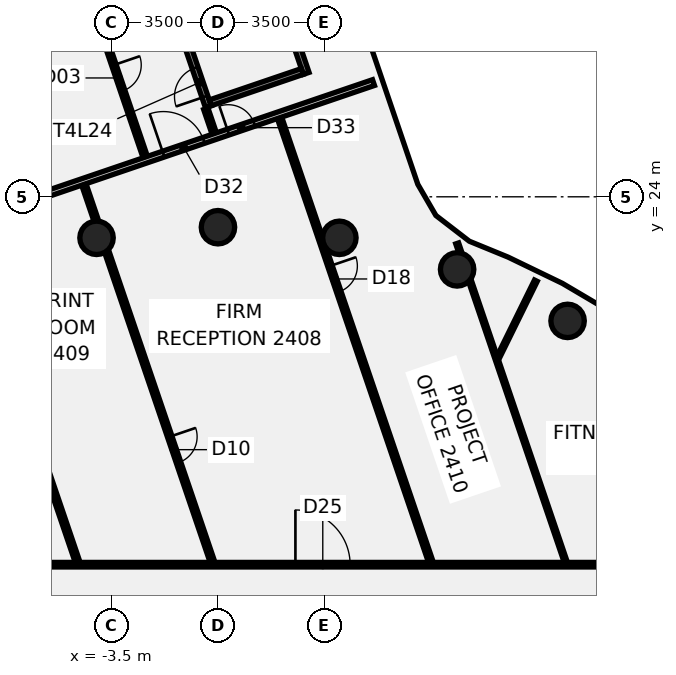
"""IFC4 building model, lengths in metres.
Left out: names, types, materials, properties, quantities, classifications, styles, units other than length and angle.
Written with IfcOpenShell. Run it as: python <this file> out.ifc"""

import sys

from ifc_helpers import new_model, si_unit, direction, frame, frame_2d, origin, origin_2d, place, context, subcontext, project, spatial, rectangle, circle, extrude, element, fill, save


model = new_model("IFC4")
c1 = context("Model", 3, precision=1e-05, world=origin(), true_north=direction((0.0, 1.0)))
c2 = subcontext(c1, "Body", "Model", "MODEL_VIEW")
j1 = project(units=[si_unit("LENGTHUNIT", "METRE"), si_unit("PLANEANGLEUNIT", "RADIAN")], contexts=[c1])
p1 = place(None, origin())
s1 = spatial("IfcSite", under=j1, at=p1, CompositionType="ELEMENT")
p2 = place(p1, origin())
s2 = spatial("IfcBuilding", under=s1, at=p2, CompositionType="ELEMENT")
p3 = place(p2, frame((0.0, 0.0, 102.25)))
s3 = spatial("IfcBuildingStorey", under=s2, at=p3, CompositionType="ELEMENT", Elevation=102.25)
for number, where, z_axis, x_axis in (
    (1, (11.5, 19.919, -0.14), (0.0, 0.0, 1.0), (1.0, 0.0, 0.0)),
    (2, (7.866, 21.613, -0.14), (0.0, 0.0, 1.0), (1.0, 0.0, 0.0)),
    (3, (3.994, 22.651, -0.14), (0.0, 0.0, 1.0), (1.0, 0.0, 0.0)),
    (4, (0.0, 23.0, -0.14), (0.0, 0.0, 1.0), (1.0, 0.0, 0.0)),
    (5, (-3.994, 22.651, -0.14), (0.0, 0.0, 1.0), (1.0, 0.0, 0.0)),
):
    element("IfcColumn", number, at=place(p3, frame(where, z_axis=z_axis, x_axis=x_axis)), inside=s3, PredefinedType="COLUMN", context=c2, shape_type="SweptSolid", body=[
        extrude(circle(Radius=0.55, at=origin_2d()), origin(), (0.0, 0.0, 1.0), 3.75),
    ])
p4 = place(p3, frame((-7.719, 21.092, 0.0), z_axis=(0.0, 0.0, 1.0), x_axis=(0.322369221252, -0.946614010666, 0.0)))
e6 = element("IfcWall", 6, at=p4, inside=s3, PredefinedType="PARTITIONING", context=c2, shape_type="SweptSolid", body=[
    extrude(rectangle(XDim=9.626, YDim=0.15, at=frame_2d((4.813, 0.0))), origin(), (0.0, 0.0, 1.0), 3.01),
])
p5 = place(p3, frame((-8.14, 42.178, 0.0), z_axis=(0.0, 0.0, 1.0), x_axis=(0.322499346539, -0.946569686543, 0.0)))
e7 = element("IfcWall", 7, at=p5, inside=s3, PredefinedType="PARTITIONING", context=c2, shape_type="SweptSolid", body=[
    extrude(rectangle(XDim=17.825, YDim=0.15, at=frame_2d((8.913, 0.0))), origin(), (0.0, 0.0, 1.0), 3.01),
])
p6 = place(p5, frame((14.625, 0.0, 0.0)))
e8 = element("IfcOpeningElement", 8, at=p6, cuts=e7, PredefinedType="OPENING", context=c2, shape_type="SweptSolid", body=[
    extrude(rectangle(XDim=0.9, YDim=2.1, at=frame_2d((0.45, 1.05))), frame((0.0, 0.085, 0.0), z_axis=(0.0, -1.0, 0.0), x_axis=(1.0, 0.0, 0.0)), (0.0, 0.0, 1.0), 0.17),
])
p7 = place(p5, frame((11.325, 0.0, 0.0)))
e9 = element("IfcOpeningElement", 9, at=p7, cuts=e7, PredefinedType="OPENING", context=c2, shape_type="SweptSolid", body=[
    extrude(rectangle(XDim=0.9, YDim=2.1, at=frame_2d((0.45, 1.05))), frame((0.0, 0.085, 0.0), z_axis=(0.0, -1.0, 0.0), x_axis=(1.0, 0.0, 0.0)), (0.0, 0.0, 1.0), 0.17),
])
p8 = place(p5, frame((5.625, 0.0, 0.0)))
e10 = element("IfcOpeningElement", 10, at=p8, cuts=e7, PredefinedType="OPENING", context=c2, shape_type="SweptSolid", body=[
    extrude(rectangle(XDim=0.9, YDim=2.1, at=frame_2d((0.45, 1.05))), frame((0.0, 0.085, 0.0), z_axis=(0.0, -1.0, 0.0), x_axis=(1.0, 0.0, 0.0)), (0.0, 0.0, 1.0), 0.17),
])
p9 = place(p5, frame((1.275, 0.0, 0.0)))
e11 = element("IfcOpeningElement", 11, at=p9, cuts=e7, PredefinedType="OPENING", context=c2, shape_type="SweptSolid", body=[
    extrude(rectangle(XDim=0.9, YDim=2.1, at=frame_2d((0.45, 1.05))), frame((0.0, 0.085, 0.0), z_axis=(0.0, -1.0, 0.0), x_axis=(1.0, 0.0, 0.0)), (0.0, 0.0, 1.0), 0.17),
])
p10 = place(p3, frame((-0.399, 26.893, 0.0), z_axis=(0.0, 0.0, 1.0), x_axis=(0.322691263615, -0.94650427806, 0.0)))
e12 = element("IfcWall", 12, at=p10, inside=s3, PredefinedType="PARTITIONING", context=c2, shape_type="SweptSolid", body=[
    extrude(rectangle(XDim=0.86, YDim=0.15, at=frame_2d((0.43, 0.0))), origin(), (0.0, 0.0, 1.0), 3.01),
])
p11 = place(p3, frame((-4.411, 24.406, 0.0), z_axis=(0.0, 0.0, 1.0), x_axis=(0.322528601909, -0.94655971864, 0.0)))
e13 = element("IfcWall", 13, at=p11, inside=s3, PredefinedType="PARTITIONING", context=c2, shape_type="SweptSolid", body=[
    extrude(rectangle(XDim=1.266, YDim=0.15, at=frame_2d((0.633, 0.0))), origin(), (0.0, 0.0, 1.0), 3.01),
])
p12 = place(p3, frame((-3.665, 22.215, 0.0), z_axis=(0.0, 0.0, 1.0), x_axis=(0.322345171012, -0.94662220063, 0.0)))
e14 = element("IfcWall", 14, at=p12, inside=s3, PredefinedType="PARTITIONING", context=c2, shape_type="SweptSolid", body=[
    extrude(rectangle(XDim=10.812, YDim=0.15, at=frame_2d((5.406, 0.0))), origin(), (0.0, 0.0, 1.0), 3.01),
])
p13 = place(p12, frame((6.45, 0.0, 0.0)))
e15 = element("IfcOpeningElement", 15, at=p13, cuts=e14, PredefinedType="OPENING", context=c2, shape_type="SweptSolid", body=[
    extrude(rectangle(XDim=0.9, YDim=2.1, at=frame_2d((0.45, 1.05))), frame((0.0, 0.085, 0.0), z_axis=(0.0, -1.0, 0.0), x_axis=(1.0, 0.0, 0.0)), (0.0, 0.0, 1.0), 0.17),
])
p14 = place(p3, frame((2.027, 26.594, 0.0), z_axis=(0.0, 0.0, 1.0), x_axis=(0.322388935649, -0.946607296703, 0.0)))
e16 = element("IfcWall", 16, at=p14, inside=s3, PredefinedType="PARTITIONING", context=c2, shape_type="SweptSolid", body=[
    extrude(rectangle(XDim=15.437, YDim=0.15, at=frame_2d((7.719, 0.0))), origin(), (0.0, 0.0, 1.0), 3.01),
])
p15 = place(p14, frame((5.145, 0.0, 0.0)))
e17 = element("IfcOpeningElement", 17, at=p15, cuts=e16, PredefinedType="OPENING", context=c2, shape_type="SweptSolid", body=[
    extrude(rectangle(XDim=0.9, YDim=2.1, at=frame_2d((0.45, 1.05))), frame((0.0, 0.085, 0.0), z_axis=(0.0, -1.0, 0.0), x_axis=(1.0, 0.0, 0.0)), (0.0, 0.0, 1.0), 0.17),
])
p16 = place(p3, frame((7.869, 22.467, 0.0), z_axis=(0.0, 0.0, 1.0), x_axis=(0.321992129505, -0.946742345381, 0.0)))
e18 = element("IfcWall", 18, at=p16, inside=s3, PredefinedType="PARTITIONING", context=c2, shape_type="SweptSolid", body=[
    extrude(rectangle(XDim=0.343, YDim=0.1, at=frame_2d((0.171, 0.0))), origin(), (0.0, 0.0, 1.0), 3.01),
])
p17 = place(p3, frame((8.28, 21.261, 0.0), z_axis=(0.0, 0.0, 1.0), x_axis=(0.322373413617, -0.946612582947, 0.0)))
e19 = element("IfcWall", 19, at=p17, inside=s3, PredefinedType="PARTITIONING", context=c2, shape_type="SweptSolid", body=[
    extrude(rectangle(XDim=9.81, YDim=0.1, at=frame_2d((4.905, 0.0))), origin(), (0.0, 0.0, 1.0), 3.01),
])
p18 = place(p3, frame((-17.065, 11.9, 0.0), z_axis=(0.0, 0.0, 1.0), x_axis=(1.0, 0.0, 0.0)))
e20 = element("IfcWall", 20, at=p18, inside=s3, PredefinedType="PARTITIONING", context=c2, shape_type="SweptSolid", body=[
    extrude(rectangle(XDim=34.165, YDim=0.15, at=frame_2d((17.083, 0.0))), origin(), (0.0, 0.0, 1.0), 3.01),
])
p19 = place(p18, frame((19.613, 0.0, 0.0)))
e21 = element("IfcOpeningElement", 21, at=p19, cuts=e20, PredefinedType="OPENING", context=c2, shape_type="SweptSolid", body=[
    extrude(rectangle(XDim=1.8, YDim=2.1, at=frame_2d((0.9, 1.05))), frame((0.0, 0.085, 0.0), z_axis=(0.0, -1.0, 0.0), x_axis=(1.0, 0.0, 0.0)), (0.0, 0.0, 1.0), 0.17),
])
p20 = place(p18, frame((30.933, 0.0, 0.0)))
e22 = element("IfcOpeningElement", 22, at=p20, cuts=e20, PredefinedType="OPENING", context=c2, shape_type="SweptSolid", body=[
    extrude(rectangle(XDim=1.8, YDim=2.1, at=frame_2d((0.9, 1.05))), frame((0.0, 0.085, 0.0), z_axis=(0.0, -1.0, 0.0), x_axis=(1.0, 0.0, 0.0)), (0.0, 0.0, 1.0), 0.17),
])
p21 = place(p18, frame((5.365, 0.0, 0.0)))
e23 = element("IfcOpeningElement", 23, at=p21, cuts=e20, PredefinedType="OPENING", context=c2, shape_type="SweptSolid", body=[
    extrude(rectangle(XDim=1.8, YDim=2.1, at=frame_2d((0.9, 1.05))), frame((0.0, 0.085, 0.0), z_axis=(0.0, -1.0, 0.0), x_axis=(1.0, 0.0, 0.0)), (0.0, 0.0, 1.0), 0.17),
])
p22 = place(p3, frame((-7.336, 28.27, 0.0), z_axis=(0.0, 0.0, 1.0), x_axis=(0.946629051869, 0.322325050467, 0.0)))
e24 = element("IfcWall", 24, at=p22, inside=s3, PredefinedType="PARTITIONING", context=c2, shape_type="SweptSolid", body=[
    extrude(rectangle(XDim=3.648, YDim=0.1, at=frame_2d((1.824, 0.0))), origin(), (0.0, 0.0, 1.0), 3.01),
])
p23 = place(p3, frame((-8.348, 23.171, 0.0), z_axis=(0.0, 0.0, 1.0), x_axis=(0.946615697292, 0.322364268555, 0.0)))
e25 = element("IfcWall", 25, at=p23, inside=s3, PredefinedType="PARTITIONING", context=c2, shape_type="SweptSolid", body=[
    extrude(rectangle(XDim=14.224, YDim=0.2, at=frame_2d((7.112, 0.0))), origin(), (0.0, 0.0, 1.0), 3.01),
])
p24 = place(p23, frame((6.925, 0.0, 0.0)))
e26 = element("IfcOpeningElement", 26, at=p24, cuts=e25, PredefinedType="OPENING", context=c2, shape_type="SweptSolid", body=[
    extrude(rectangle(XDim=1.4, YDim=2.1, at=frame_2d((0.7, 1.05))), frame((0.0, 0.11, 0.0), z_axis=(0.0, -1.0, 0.0), x_axis=(1.0, 0.0, 0.0)), (0.0, 0.0, 1.0), 0.22),
])
p25 = place(p23, frame((9.175, 0.0, 0.0)))
e27 = element("IfcOpeningElement", 27, at=p25, cuts=e25, PredefinedType="OPENING", context=c2, shape_type="SweptSolid", body=[
    extrude(rectangle(XDim=0.9, YDim=2.1, at=frame_2d((0.45, 1.05))), frame((0.0, 0.11, 0.0), z_axis=(0.0, -1.0, 0.0), x_axis=(1.0, 0.0, 0.0)), (0.0, 0.0, 1.0), 0.22),
])
p26 = place(p3, frame((9.219, 18.726, 0.0), z_axis=(0.0, 0.0, 1.0), x_axis=(0.441524350623, 0.897249267376, 0.0)))
e28 = element("IfcWall", 28, at=p26, inside=s3, PredefinedType="PARTITIONING", context=c2, shape_type="SweptSolid", body=[
    extrude(rectangle(XDim=2.802, YDim=0.1, at=frame_2d((1.401, 0.0))), origin(), (0.0, 0.0, 1.0), 3.01),
])
p27 = place(p3, frame((-0.317, 26.963, -0.14), z_axis=(0.0, 0.0, 1.0), x_axis=(-0.322375655092, 0.946611819599, 0.0)))
e29 = element("IfcWall", 29, at=p27, inside=s3, PredefinedType="SHEAR", context=c2, shape_type="SweptSolid", body=[
    extrude(rectangle(XDim=6.7, YDim=0.2, at=frame_2d((3.35, 0.0))), origin(), (0.0, 0.0, 1.0), 3.15),
])
p28 = place(p27, frame((0.35, 0.0, 0.0)))
e30 = element("IfcOpeningElement", 30, at=p28, cuts=e29, PredefinedType="OPENING", context=c2, shape_type="SweptSolid", body=[
    extrude(rectangle(XDim=1.0, YDim=2.1, at=frame_2d((0.5, 1.05))), frame((0.0, 0.11, 0.0), z_axis=(0.0, -1.0, 0.0), x_axis=(1.0, 0.0, 0.0)), (0.0, 0.0, 1.0), 0.22),
])
p29 = place(p3, frame((2.902, 28.059, -0.14), z_axis=(0.0, 0.0, 1.0), x_axis=(-0.322375655092, 0.946611819599, 0.0)))
e31 = element("IfcWall", 31, at=p29, inside=s3, PredefinedType="SHEAR", context=c2, shape_type="SweptSolid", body=[
    extrude(rectangle(XDim=6.7, YDim=0.2, at=frame_2d((3.35, 0.0))), origin(), (0.0, 0.0, 1.0), 3.15),
])
p30 = place(p3, frame((2.775, 28.121, -0.14), z_axis=(0.0, 0.0, 1.0), x_axis=(-0.946603348589, -0.322400527977, 0.0)))
e32 = element("IfcWall", 32, at=p30, inside=s3, PredefinedType="SHEAR", context=c2, shape_type="SweptSolid", body=[
    extrude(rectangle(XDim=3.2, YDim=0.2, at=frame_2d((1.6, 0.0))), origin(), (0.0, 0.0, 1.0), 3.15),
])
p31 = place(p6, frame((0.9, 0.0, 0.0), z_axis=(0.0, 0.0, 1.0), x_axis=(-1.0, 0.0, 0.0)))
e33 = element("IfcDoor", 33, at=p31, inside=s3, OperationType="SINGLE_SWING_RIGHT", PredefinedType="DOOR", context=c2, shape_type="SweptSolid", body=[
    extrude(rectangle(XDim=0.9, YDim=2.1, at=frame_2d((0.45, 1.05))), frame((0.0, 0.025, 0.0), z_axis=(0.0, -1.0, 0.0), x_axis=(1.0, 0.0, 0.0)), (0.0, 0.0, 1.0), 0.05),
])
fill(e8, e33)
p32 = place(p13, frame((0.9, 0.0, 0.0), z_axis=(0.0, 0.0, 1.0), x_axis=(-1.0, 0.0, 0.0)))
e34 = element("IfcDoor", 34, at=p32, inside=s3, OperationType="SINGLE_SWING_RIGHT", PredefinedType="DOOR", context=c2, shape_type="SweptSolid", body=[
    extrude(rectangle(XDim=0.9, YDim=2.1, at=frame_2d((0.45, 1.05))), frame((0.0, 0.025, 0.0), z_axis=(0.0, -1.0, 0.0), x_axis=(1.0, 0.0, 0.0)), (0.0, 0.0, 1.0), 0.05),
])
fill(e15, e34)
p33 = place(p15, origin())
e35 = element("IfcDoor", 35, at=p33, inside=s3, OperationType="SINGLE_SWING_RIGHT", PredefinedType="DOOR", context=c2, shape_type="SweptSolid", body=[
    extrude(rectangle(XDim=0.9, YDim=2.1, at=frame_2d((0.45, 1.05))), frame((0.0, 0.025, 0.0), z_axis=(0.0, -1.0, 0.0), x_axis=(1.0, 0.0, 0.0)), (0.0, 0.0, 1.0), 0.05),
])
fill(e17, e35)
p34 = place(p19, frame((1.8, 0.0, 0.0), z_axis=(0.0, 0.0, 1.0), x_axis=(-1.0, 0.0, 0.0)))
e36 = element("IfcDoor", 36, at=p34, inside=s3, OperationType="DOUBLE_DOOR_SINGLE_SWING", PredefinedType="DOOR", context=c2, shape_type="SweptSolid", body=[
    extrude(rectangle(XDim=1.8, YDim=2.1, at=frame_2d((0.9, 1.05))), frame((0.0, 0.025, 0.0), z_axis=(0.0, -1.0, 0.0), x_axis=(1.0, 0.0, 0.0)), (0.0, 0.0, 1.0), 0.05),
])
fill(e21, e36)
p35 = place(p24, frame((1.4, 0.0, 0.0), z_axis=(0.0, 0.0, 1.0), x_axis=(-1.0, 0.0, 0.0)))
e37 = element("IfcDoor", 37, at=p35, inside=s3, OperationType="DOUBLE_DOOR_SINGLE_SWING", PredefinedType="DOOR", context=c2, shape_type="SweptSolid", body=[
    extrude(rectangle(XDim=1.4, YDim=2.1, at=frame_2d((0.7, 1.05))), frame((0.0, 0.025, 0.0), z_axis=(0.0, -1.0, 0.0), x_axis=(1.0, 0.0, 0.0)), (0.0, 0.0, 1.0), 0.05),
])
fill(e26, e37)
p36 = place(p25, origin())
e38 = element("IfcDoor", 38, at=p36, inside=s3, OperationType="SINGLE_SWING_LEFT", PredefinedType="DOOR", context=c2, shape_type="SweptSolid", body=[
    extrude(rectangle(XDim=0.9, YDim=2.1, at=frame_2d((0.45, 1.05))), frame((0.0, 0.025, 0.0), z_axis=(0.0, -1.0, 0.0), x_axis=(1.0, 0.0, 0.0)), (0.0, 0.0, 1.0), 0.05),
])
fill(e27, e38)
p37 = place(p28, origin())
e39 = element("IfcDoor", 39, at=p37, inside=s3, OperationType="SINGLE_SWING_LEFT", PredefinedType="DOOR", context=c2, shape_type="SweptSolid", body=[
    extrude(rectangle(XDim=1.0, YDim=2.1, at=frame_2d((0.5, 1.05))), frame((0.0, 0.025, 0.0), z_axis=(0.0, -1.0, 0.0), x_axis=(1.0, 0.0, 0.0)), (0.0, 0.0, 1.0), 0.05),
])
fill(e30, e39)
save(model, sys.argv[1])
